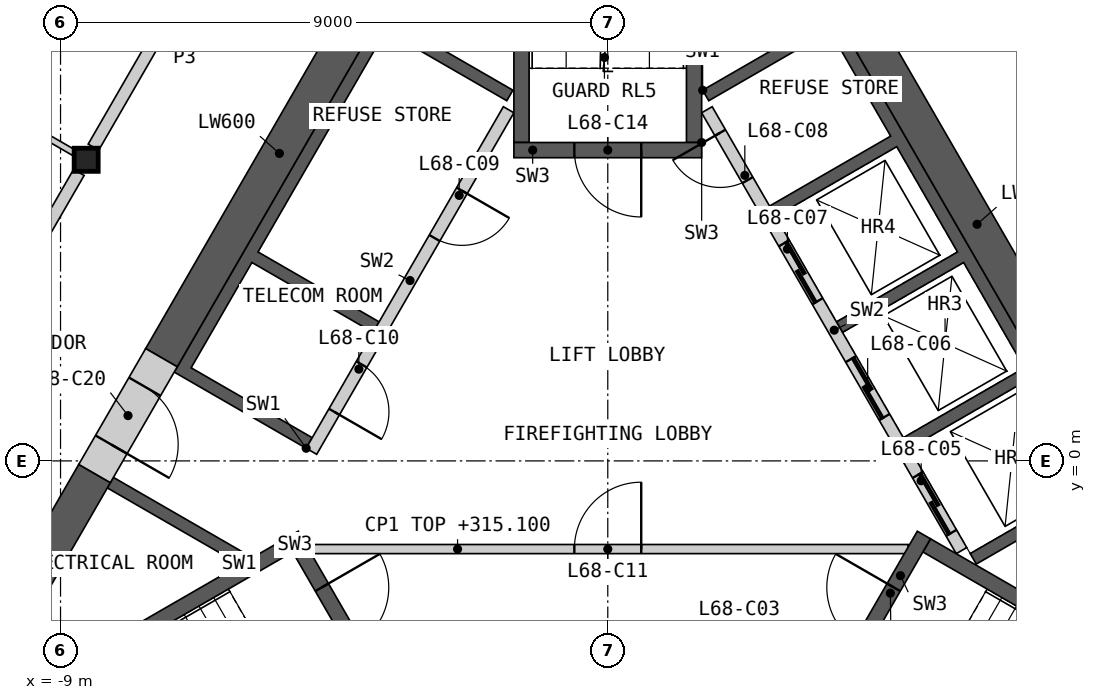
"""IFC4 building model, lengths in metres.
Left out: names, types, materials, properties, quantities, classifications, styles, units other than length and angle.
Written with IfcOpenShell. Run it as: python <this file> out.ifc"""

import sys

from ifc_helpers import new_model, si_unit, direction, frame, frame_2d, origin, origin_2d, place, context, subcontext, project, spatial, polyline, rectangle, i_section, outline, extrude, element, fill, save


model = new_model("IFC4")
c1 = context("Model", 3, precision=1e-05, world=origin(), true_north=direction((0.0, 1.0)))
c2 = subcontext(c1, "Body", "Model", "MODEL_VIEW")
j1 = project(units=[si_unit("LENGTHUNIT", "METRE"), si_unit("PLANEANGLEUNIT", "RADIAN")], contexts=[c1])
p1 = place(None, origin())
s1 = spatial("IfcSite", under=j1, at=p1, CompositionType="ELEMENT")
p2 = place(p1, origin())
s2 = spatial("IfcBuilding", under=s1, at=p2, CompositionType="ELEMENT")
p3 = place(p2, frame((0.0, 0.0, 312.0)))
s3 = spatial("IfcBuildingStorey", under=s2, at=p3, CompositionType="ELEMENT", Elevation=312.0)
p4 = place(p3, frame((-8.578, 4.953, 0.0), z_axis=(0.0, 0.0, 1.0), x_axis=(1.0, 0.0, 0.0)))
e1 = element("IfcColumn", 1, at=p4, inside=s3, PredefinedType="COLUMN", context=c2, shape_type="SweptSolid", body=[
    extrude(i_section(OverallWidth=0.396, OverallDepth=0.381, WebThickness=0.019, FlangeThickness=0.03, at=origin_2d()), origin(), (0.0, 0.0, 1.0), 3.4),
])
p5 = place(p3, origin())
e2 = element("IfcWall", 2, at=p5, inside=s3, PredefinedType="SHEAR", context=c2, shape_type="SweptSolid", body=[
    extrude(outline(polyline([(1.561, 6.097), (3.731, 7.35), (8.231, -0.444), (6.061, -1.697), (5.96, -1.524), (7.952, -0.374), (6.952, 1.358), (4.96, 0.208), (4.861, 0.381), (6.852, 1.531), (5.852, 3.263), (3.861, 2.113), (3.76, 2.287), (5.752, 3.437), (4.752, 5.169), (2.76, 4.019), (2.66, 4.192), (4.652, 5.342), (3.652, 7.074), (1.66, 5.924), (1.561, 6.097)])), origin(), (0.0, 0.0, 1.0), 3.1),
])
p6 = place(p3, frame((5.817, -1.476, 0.0), z_axis=(0.0, 0.0, 1.0), x_axis=(-0.500002616675, 0.866023893041, 0.0)))
e3 = element("IfcWall", 3, at=p6, inside=s3, PredefinedType="SOLIDWALL", context=c2, shape_type="SweptSolid", body=[
    extrude(rectangle(XDim=8.373, YDim=0.2, at=frame_2d((4.187, 0.0))), origin(), (0.0, 0.0, 1.0), 3.1),
])
p7 = place(p6, frame((0.337, 0.0, 0.0)))
e4 = element("IfcOpeningElement", 4, at=p7, cuts=e3, PredefinedType="OPENING", context=c2, shape_type="SweptSolid", body=[
    extrude(rectangle(XDim=1.1, YDim=2.1, at=frame_2d((0.55, 1.05))), frame((0.0, 0.11, 0.0), z_axis=(0.0, -1.0, 0.0), x_axis=(1.0, 0.0, 0.0)), (0.0, 0.0, 1.0), 0.22),
])
p8 = place(p6, frame((2.537, 0.0, 0.0)))
e5 = element("IfcOpeningElement", 5, at=p8, cuts=e3, PredefinedType="OPENING", context=c2, shape_type="SweptSolid", body=[
    extrude(rectangle(XDim=1.1, YDim=2.1, at=frame_2d((0.55, 1.05))), frame((0.0, 0.11, 0.0), z_axis=(0.0, -1.0, 0.0), x_axis=(1.0, 0.0, 0.0)), (0.0, 0.0, 1.0), 0.22),
])
p9 = place(p6, frame((4.737, 0.0, 0.0)))
e6 = element("IfcOpeningElement", 6, at=p9, cuts=e3, PredefinedType="OPENING", context=c2, shape_type="SweptSolid", body=[
    extrude(rectangle(XDim=1.1, YDim=2.1, at=frame_2d((0.55, 1.05))), frame((0.0, 0.11, 0.0), z_axis=(0.0, -1.0, 0.0), x_axis=(1.0, 0.0, 0.0)), (0.0, 0.0, 1.0), 0.22),
])
p10 = place(p6, frame((7.037, 0.0, 0.0)))
e7 = element("IfcOpeningElement", 7, at=p10, cuts=e3, PredefinedType="OPENING", context=c2, shape_type="SweptSolid", body=[
    extrude(rectangle(XDim=0.9, YDim=2.1, at=frame_2d((0.45, 1.05))), frame((0.0, 0.11, 0.0), z_axis=(0.0, -1.0, 0.0), x_axis=(1.0, 0.0, 0.0)), (0.0, 0.0, 1.0), 0.22),
])
p11 = place(p3, origin())
e8 = element("IfcWall", 8, at=p11, inside=s3, PredefinedType="SHEAR", context=c2, shape_type="SweptSolid", body=[
    extrude(outline(polyline([(-6.061, -1.697), (-8.231, -0.444), (-8.131, -0.271), (-5.96, -1.524), (-6.061, -1.697)])), origin(), (0.0, 0.0, 1.0), 3.1),
])
p12 = place(p3, origin())
e9 = element("IfcWall", 9, at=p12, inside=s3, PredefinedType="SHEAR", context=c2, shape_type="SweptSolid", body=[
    extrude(outline(polyline([(-4.96, 0.208), (-7.131, 1.461), (-3.731, 7.35), (-1.561, 6.097), (-1.66, 5.924), (-3.652, 7.074), (-5.752, 3.437), (-3.76, 2.287), (-3.861, 2.113), (-5.852, 3.263), (-6.852, 1.531), (-4.861, 0.381), (-4.96, 0.208)])), origin(), (0.0, 0.0, 1.0), 3.1),
])
p13 = place(p3, frame((-1.631, 5.776, 0.0), z_axis=(0.0, 0.0, 1.0), x_axis=(-0.499992876559, -0.866029516466, 0.0)))
e10 = element("IfcWall", 10, at=p13, inside=s3, PredefinedType="SOLIDWALL", context=c2, shape_type="SweptSolid", body=[
    extrude(rectangle(XDim=6.486, YDim=0.2, at=frame_2d((3.243, 0.0))), origin(), (0.0, 0.0, 1.0), 3.1),
])
p14 = place(p13, frame((1.537, 0.0, 0.0)))
e11 = element("IfcOpeningElement", 11, at=p14, cuts=e10, PredefinedType="OPENING", context=c2, shape_type="SweptSolid", body=[
    extrude(rectangle(XDim=0.9, YDim=2.1, at=frame_2d((0.45, 1.05))), frame((0.0, 0.11, 0.0), z_axis=(0.0, -1.0, 0.0), x_axis=(1.0, 0.0, 0.0)), (0.0, 0.0, 1.0), 0.22),
])
p15 = place(p13, frame((4.837, 0.0, 0.0)))
e12 = element("IfcOpeningElement", 12, at=p15, cuts=e10, PredefinedType="OPENING", context=c2, shape_type="SweptSolid", body=[
    extrude(rectangle(XDim=0.9, YDim=2.1, at=frame_2d((0.45, 1.05))), frame((0.0, 0.11, 0.0), z_axis=(0.0, -1.0, 0.0), x_axis=(1.0, 0.0, 0.0)), (0.0, 0.0, 1.0), 0.22),
])
p16 = place(p3, frame((-4.941, -1.45, 0.0), z_axis=(0.0, 0.0, 1.0), x_axis=(1.0, 0.0, 0.0)))
e13 = element("IfcWall", 13, at=p16, inside=s3, PredefinedType="PARTITIONING", context=c2, shape_type="SweptSolid", body=[
    extrude(rectangle(XDim=9.882, YDim=0.15, at=frame_2d((4.941, 0.0))), origin(), (0.0, 0.0, 1.0), 3.1),
])
p17 = place(p16, frame((4.391, 0.0, 0.0)))
e14 = element("IfcOpeningElement", 14, at=p17, cuts=e13, PredefinedType="OPENING", context=c2, shape_type="SweptSolid", body=[
    extrude(rectangle(XDim=1.1, YDim=2.1, at=frame_2d((0.55, 1.05))), frame((0.0, 0.085, 0.0), z_axis=(0.0, -1.0, 0.0), x_axis=(1.0, 0.0, 0.0)), (0.0, 0.0, 1.0), 0.17),
])
p18 = place(p3, origin())
e15 = element("IfcWall", 15, at=p18, inside=s3, PredefinedType="SHEAR", context=c2, shape_type="SweptSolid", body=[
    extrude(outline(polyline([(-5.307, -1.281), (-10.374, -4.206), (-10.032, -4.298), (-5.182, -1.498), (-5.307, -1.281)])), origin(), (0.0, 0.0, 1.0), 3.1),
])
p19 = place(p3, frame((-5.199, -1.219, 0.0), z_axis=(0.0, 0.0, 1.0), x_axis=(0.499982516597, -0.866035497597, 0.0)))
e16 = element("IfcWall", 16, at=p19, inside=s3, PredefinedType="SHEAR", context=c2, shape_type="SweptSolid", body=[
    extrude(rectangle(XDim=3.088, YDim=0.25, at=frame_2d((1.544, 0.0))), origin(), (0.0, 0.0, 1.0), 3.1),
])
p20 = place(p19, frame((0.994, 0.0, 0.0)))
e17 = element("IfcOpeningElement", 17, at=p20, cuts=e16, PredefinedType="OPENING", context=c2, shape_type="SweptSolid", body=[
    extrude(rectangle(XDim=1.1, YDim=2.1, at=frame_2d((0.55, 1.05))), frame((0.0, 0.135, 0.0), z_axis=(0.0, -1.0, 0.0), x_axis=(1.0, 0.0, 0.0)), (0.0, 0.0, 1.0), 0.27),
])
p21 = place(p3, origin())
e18 = element("IfcWall", 18, at=p21, inside=s3, PredefinedType="SHEAR", context=c2, shape_type="SweptSolid", body=[
    extrude(outline(polyline([(10.032, -4.298), (10.374, -4.206), (5.307, -1.281), (5.182, -1.498), (10.032, -4.298)])), origin(), (0.0, 0.0, 1.0), 3.1),
])
p22 = place(p3, frame((3.655, -3.893, 0.0), z_axis=(0.0, 0.0, 1.0), x_axis=(0.499982516597, 0.866035497597, 0.0)))
e19 = element("IfcWall", 19, at=p22, inside=s3, PredefinedType="SHEAR", context=c2, shape_type="SweptSolid", body=[
    extrude(rectangle(XDim=3.088, YDim=0.25, at=frame_2d((1.544, 0.0))), origin(), (0.0, 0.0, 1.0), 3.1),
])
p23 = place(p22, frame((0.994, 0.0, 0.0)))
e20 = element("IfcOpeningElement", 20, at=p23, cuts=e19, PredefinedType="OPENING", context=c2, shape_type="SweptSolid", body=[
    extrude(rectangle(XDim=1.1, YDim=2.1, at=frame_2d((0.55, 1.05))), frame((0.0, 0.135, 0.0), z_axis=(0.0, -1.0, 0.0), x_axis=(1.0, 0.0, 0.0)), (0.0, 0.0, 1.0), 0.27),
])
p24 = place(p3, origin())
e21 = element("IfcWall", 21, at=p24, inside=s3, PredefinedType="SHEAR", context=c2, shape_type="SweptSolid", body=[
    extrude(outline(polyline([(1.544, 5.237), (1.544, 11.087), (1.294, 10.837), (1.294, 5.237), (1.544, 5.237)])), origin(), (0.0, 0.0, 1.0), 3.1),
])
p25 = place(p3, origin())
e22 = element("IfcWall", 22, at=p25, inside=s3, PredefinedType="SHEAR", context=c2, shape_type="SweptSolid", body=[
    extrude(outline(polyline([(-1.294, 10.837), (-1.544, 11.087), (-1.544, 5.237), (-1.294, 5.237), (-1.294, 10.837)])), origin(), (0.0, 0.0, 1.0), 3.1),
])
p26 = place(p3, frame((1.544, 5.112, 0.0), z_axis=(0.0, 0.0, 1.0), x_axis=(-1.0, 0.0, 0.0)))
e23 = element("IfcWall", 23, at=p26, inside=s3, PredefinedType="SHEAR", context=c2, shape_type="SweptSolid", body=[
    extrude(rectangle(XDim=3.088, YDim=0.25, at=frame_2d((1.544, 0.0))), origin(), (0.0, 0.0, 1.0), 3.1),
])
p27 = place(p26, frame((0.994, 0.0, 0.0)))
e24 = element("IfcOpeningElement", 24, at=p27, cuts=e23, PredefinedType="OPENING", context=c2, shape_type="SweptSolid", body=[
    extrude(rectangle(XDim=1.1, YDim=2.1, at=frame_2d((0.55, 1.05))), frame((0.0, 0.135, 0.0), z_axis=(0.0, -1.0, 0.0), x_axis=(1.0, 0.0, 0.0)), (0.0, 0.0, 1.0), 0.27),
])
p28 = place(p3, frame((8.686, -0.634, 0.0), z_axis=(0.0, 0.0, 1.0), x_axis=(-0.50001836461, 0.866014800712, 0.0)))
e25 = element("IfcWall", 25, at=p28, inside=s3, PredefinedType="SHEAR", context=c2, shape_type="SweptSolid", body=[
    extrude(rectangle(XDim=10.451, YDim=0.6, at=frame_2d((5.225, 0.0))), origin(), (0.0, 0.0, 1.0), 3.1),
])
p29 = place(p3, frame((-3.461, 8.417, 0.0), z_axis=(0.0, 0.0, 1.0), x_axis=(-0.50000391502, -0.866023143435, 0.0)))
e26 = element("IfcWall", 26, at=p29, inside=s3, PredefinedType="SHEAR", context=c2, shape_type="SweptSolid", body=[
    extrude(rectangle(XDim=7.759, YDim=0.6, at=frame_2d((3.879, 0.0))), origin(), (0.0, 0.0, 1.0), 3.1),
])
p30 = place(p3, frame((-8.44, -0.208, 0.0), z_axis=(0.0, 0.0, 1.0), x_axis=(-0.500007425856, -0.866021116422, 0.0)))
e27 = element("IfcWall", 27, at=p30, inside=s3, PredefinedType="SHEAR", context=c2, shape_type="SweptSolid", body=[
    extrude(rectangle(XDim=4.969, YDim=0.6, at=frame_2d((2.484, 0.0))), origin(), (0.0, 0.0, 1.0), 3.1),
])
p31 = place(p3, frame((-7.34, 1.698, 0.0), z_axis=(0.0, 0.0, 1.0), x_axis=(-0.50002983664, -0.866008176907, 0.0)))
e28 = element("IfcWall", 28, at=p31, inside=s3, PredefinedType="SHEAR", context=c2, shape_type="SweptSolid", body=[
    extrude(rectangle(XDim=2.2, YDim=0.6, at=frame_2d((1.1, 0.0))), origin(), (0.0, 0.0, 1.0), 3.1),
])
p32 = place(p31, frame((0.55, 0.0, 0.0)))
e29 = element("IfcOpeningElement", 29, at=p32, cuts=e28, PredefinedType="OPENING", context=c2, shape_type="SweptSolid", body=[
    extrude(rectangle(XDim=1.1, YDim=2.1, at=frame_2d((0.55, 1.05))), frame((0.0, 0.31, 0.0), z_axis=(0.0, -1.0, 0.0), x_axis=(1.0, 0.0, 0.0)), (0.0, 0.0, 1.0), 0.62),
])
p33 = place(p3, frame((-8.458, 5.16, 0.0), z_axis=(0.0, 0.0, 1.0), x_axis=(0.499984266882, 0.866034487114, 0.0)))
e30 = element("IfcWall", 30, at=p33, inside=s3, PredefinedType="PARTITIONING", context=c2, shape_type="SweptSolid", body=[
    extrude(rectangle(XDim=8.099, YDim=0.2, at=frame_2d((4.049, 0.0))), origin(), (0.0, 0.0, 1.0), 3.1),
])
p34 = place(p33, frame((3.093, 0.0, 0.0)))
e31 = element("IfcOpeningElement", 31, at=p34, cuts=e30, PredefinedType="OPENING", context=c2, shape_type="SweptSolid", body=[
    extrude(rectangle(XDim=1.0, YDim=2.1, at=frame_2d((0.5, 1.05))), frame((0.0, 0.11, 0.0), z_axis=(0.0, -1.0, 0.0), x_axis=(1.0, 0.0, 0.0)), (0.0, 0.0, 1.0), 0.22),
])
p35 = place(p3, frame((-12.748, -2.269, 0.0), z_axis=(0.0, 0.0, 1.0), x_axis=(0.499984266882, 0.866034487114, 0.0)))
e32 = element("IfcWall", 32, at=p35, inside=s3, PredefinedType="PARTITIONING", context=c2, shape_type="SweptSolid", body=[
    extrude(rectangle(XDim=8.099, YDim=0.2, at=frame_2d((4.049, 0.0))), origin(), (0.0, 0.0, 1.0), 3.1),
])
p36 = place(p35, frame((1.164, 0.0, 0.0)))
e33 = element("IfcOpeningElement", 33, at=p36, cuts=e32, PredefinedType="OPENING", context=c2, shape_type="SweptSolid", body=[
    extrude(rectangle(XDim=1.0, YDim=2.1, at=frame_2d((0.5, 1.05))), frame((0.0, 0.11, 0.0), z_axis=(0.0, -1.0, 0.0), x_axis=(1.0, 0.0, 0.0)), (0.0, 0.0, 1.0), 0.22),
])
p37 = place(p3, frame((4.409, 12.174, 0.0), z_axis=(0.0, 0.0, 1.0), x_axis=(0.499984266882, -0.866034487114, 0.0)))
e34 = element("IfcWall", 34, at=p37, inside=s3, PredefinedType="PARTITIONING", context=c2, shape_type="SweptSolid", body=[
    extrude(rectangle(XDim=8.099, YDim=0.2, at=frame_2d((4.049, 0.0))), origin(), (0.0, 0.0, 1.0), 3.1),
])
p38 = place(p37, frame((3.905, 0.0, 0.0)))
e35 = element("IfcOpeningElement", 35, at=p38, cuts=e34, PredefinedType="OPENING", context=c2, shape_type="SweptSolid", body=[
    extrude(rectangle(XDim=1.0, YDim=2.1, at=frame_2d((0.5, 1.05))), frame((0.0, 0.11, 0.0), z_axis=(0.0, -1.0, 0.0), x_axis=(1.0, 0.0, 0.0)), (0.0, 0.0, 1.0), 0.22),
])
p39 = place(p3, frame((6.74, 15.739, 0.0), z_axis=(0.0, 0.0, 1.0), x_axis=(0.499995022685, -0.86602827742, 0.0)))
e36 = element("IfcWall", 36, at=p39, inside=s3, PredefinedType="PARTITIONING", context=c2, shape_type="SweptSolid", body=[
    extrude(rectangle(XDim=15.404, YDim=0.1, at=frame_2d((7.702, 0.0))), origin(), (0.0, 0.0, 1.0), 2.33),
])
p40 = place(p39, frame((8.582, 0.0, 0.0)))
e37 = element("IfcOpeningElement", 37, at=p40, cuts=e36, PredefinedType="OPENING", context=c2, shape_type="SweptSolid", body=[
    extrude(rectangle(XDim=0.95, YDim=2.1, at=frame_2d((0.475, 1.05))), frame((0.0, 0.06, 0.0), z_axis=(0.0, -1.0, 0.0), x_axis=(1.0, 0.0, 0.0)), (0.0, 0.0, 1.0), 0.12),
])
p41 = place(p3, frame((6.504, 12.572, 0.0), z_axis=(0.0, 0.0, 1.0), x_axis=(0.499998094172, -0.866026504112, 0.0)))
e38 = element("IfcWall", 38, at=p41, inside=s3, PredefinedType="PARTITIONING", context=c2, shape_type="SweptSolid", body=[
    extrude(rectangle(XDim=12.778, YDim=0.1, at=frame_2d((6.389, 0.0))), origin(), (0.0, 0.0, 1.0), 2.33),
])
p42 = place(p41, frame((3.759, 0.0, 0.0)))
e39 = element("IfcOpeningElement", 39, at=p42, cuts=e38, PredefinedType="OPENING", context=c2, shape_type="SweptSolid", body=[
    extrude(rectangle(XDim=0.95, YDim=2.1, at=frame_2d((0.475, 1.05))), frame((0.0, 0.06, 0.0), z_axis=(0.0, -1.0, 0.0), x_axis=(1.0, 0.0, 0.0)), (0.0, 0.0, 1.0), 0.12),
])
p43 = place(p3, frame((-13.386, 7.729, 0.0), z_axis=(0.0, 0.0, 1.0), x_axis=(0.866034036823, -0.49998504684, 0.0)))
e40 = element("IfcWall", 40, at=p43, inside=s3, PredefinedType="PARTITIONING", context=c2, shape_type="SweptSolid", body=[
    extrude(rectangle(XDim=5.312, YDim=0.1, at=frame_2d((2.656, 0.0))), origin(), (0.0, 0.0, 1.0), 2.33),
])
p44 = place(p7, origin())
e41 = element("IfcDoor", 41, at=p44, inside=s3, OperationType="SLIDING_TO_LEFT", PredefinedType="DOOR", context=c2, shape_type="SweptSolid", body=[
    extrude(rectangle(XDim=1.1, YDim=2.1, at=frame_2d((0.55, 1.05))), frame((0.0, 0.025, 0.0), z_axis=(0.0, -1.0, 0.0), x_axis=(1.0, 0.0, 0.0)), (0.0, 0.0, 1.0), 0.05),
])
fill(e4, e41)
p45 = place(p8, origin())
e42 = element("IfcDoor", 42, at=p45, inside=s3, OperationType="SLIDING_TO_LEFT", PredefinedType="DOOR", context=c2, shape_type="SweptSolid", body=[
    extrude(rectangle(XDim=1.1, YDim=2.1, at=frame_2d((0.55, 1.05))), frame((0.0, 0.025, 0.0), z_axis=(0.0, -1.0, 0.0), x_axis=(1.0, 0.0, 0.0)), (0.0, 0.0, 1.0), 0.05),
])
fill(e5, e42)
p46 = place(p9, origin())
e43 = element("IfcDoor", 43, at=p46, inside=s3, OperationType="SLIDING_TO_LEFT", PredefinedType="DOOR", context=c2, shape_type="SweptSolid", body=[
    extrude(rectangle(XDim=1.1, YDim=2.1, at=frame_2d((0.55, 1.05))), frame((0.0, 0.025, 0.0), z_axis=(0.0, -1.0, 0.0), x_axis=(1.0, 0.0, 0.0)), (0.0, 0.0, 1.0), 0.05),
])
fill(e6, e43)
p47 = place(p10, origin())
e44 = element("IfcDoor", 44, at=p47, inside=s3, OperationType="SINGLE_SWING_RIGHT", PredefinedType="DOOR", context=c2, shape_type="SweptSolid", body=[
    extrude(rectangle(XDim=0.9, YDim=2.1, at=frame_2d((0.45, 1.05))), frame((0.0, 0.025, 0.0), z_axis=(0.0, -1.0, 0.0), x_axis=(1.0, 0.0, 0.0)), (0.0, 0.0, 1.0), 0.05),
])
fill(e7, e44)
p48 = place(p14, origin())
e45 = element("IfcDoor", 45, at=p48, inside=s3, OperationType="SINGLE_SWING_LEFT", PredefinedType="DOOR", context=c2, shape_type="SweptSolid", body=[
    extrude(rectangle(XDim=0.9, YDim=2.1, at=frame_2d((0.45, 1.05))), frame((0.0, 0.025, 0.0), z_axis=(0.0, -1.0, 0.0), x_axis=(1.0, 0.0, 0.0)), (0.0, 0.0, 1.0), 0.05),
])
fill(e11, e45)
p49 = place(p15, origin())
e46 = element("IfcDoor", 46, at=p49, inside=s3, OperationType="SINGLE_SWING_RIGHT", PredefinedType="DOOR", context=c2, shape_type="SweptSolid", body=[
    extrude(rectangle(XDim=0.9, YDim=2.1, at=frame_2d((0.45, 1.05))), frame((0.0, 0.025, 0.0), z_axis=(0.0, -1.0, 0.0), x_axis=(1.0, 0.0, 0.0)), (0.0, 0.0, 1.0), 0.05),
])
fill(e12, e46)
p50 = place(p17, origin())
e47 = element("IfcDoor", 47, at=p50, inside=s3, OperationType="SINGLE_SWING_RIGHT", PredefinedType="DOOR", context=c2, shape_type="SweptSolid", body=[
    extrude(rectangle(XDim=1.1, YDim=2.1, at=frame_2d((0.55, 1.05))), frame((0.0, 0.025, 0.0), z_axis=(0.0, -1.0, 0.0), x_axis=(1.0, 0.0, 0.0)), (0.0, 0.0, 1.0), 0.05),
])
fill(e14, e47)
p51 = place(p20, origin())
e48 = element("IfcDoor", 48, at=p51, inside=s3, OperationType="SINGLE_SWING_LEFT", PredefinedType="DOOR", context=c2, shape_type="SweptSolid", body=[
    extrude(rectangle(XDim=1.1, YDim=2.1, at=frame_2d((0.55, 1.05))), frame((0.0, 0.025, 0.0), z_axis=(0.0, -1.0, 0.0), x_axis=(1.0, 0.0, 0.0)), (0.0, 0.0, 1.0), 0.05),
])
fill(e17, e48)
p52 = place(p23, origin())
e49 = element("IfcDoor", 49, at=p52, inside=s3, OperationType="SINGLE_SWING_RIGHT", PredefinedType="DOOR", context=c2, shape_type="SweptSolid", body=[
    extrude(rectangle(XDim=1.1, YDim=2.1, at=frame_2d((0.55, 1.05))), frame((0.0, 0.025, 0.0), z_axis=(0.0, -1.0, 0.0), x_axis=(1.0, 0.0, 0.0)), (0.0, 0.0, 1.0), 0.05),
])
fill(e20, e49)
p53 = place(p27, origin())
e50 = element("IfcDoor", 50, at=p53, inside=s3, OperationType="SINGLE_SWING_LEFT", PredefinedType="DOOR", context=c2, shape_type="SweptSolid", body=[
    extrude(rectangle(XDim=1.1, YDim=2.1, at=frame_2d((0.55, 1.05))), frame((0.0, 0.025, 0.0), z_axis=(0.0, -1.0, 0.0), x_axis=(1.0, 0.0, 0.0)), (0.0, 0.0, 1.0), 0.05),
])
fill(e24, e50)
p54 = place(p32, origin())
e51 = element("IfcDoor", 51, at=p54, inside=s3, OperationType="SINGLE_SWING_RIGHT", PredefinedType="DOOR", context=c2, shape_type="SweptSolid", body=[
    extrude(rectangle(XDim=1.1, YDim=2.1, at=frame_2d((0.55, 1.05))), frame((0.0, 0.055, 0.0), z_axis=(0.0, -1.0, 0.0), x_axis=(1.0, 0.0, 0.0)), (0.0, 0.0, 1.0), 0.05),
])
fill(e29, e51)
save(model, sys.argv[1])
